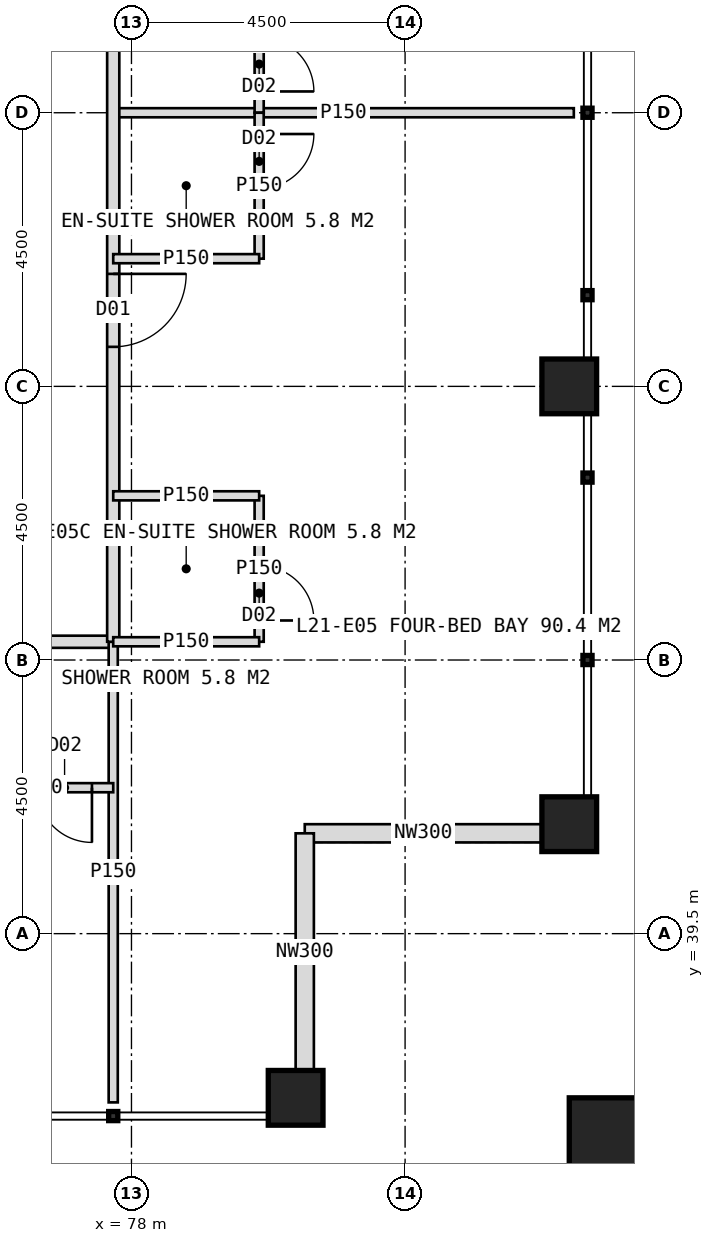
"""IFC4 building model, lengths in metres.
Left out: names, types, materials, properties, quantities, classifications, styles, units other than length and angle.
Written with IfcOpenShell. Run it as: python <this file> out.ifc"""

import sys

from ifc_helpers import new_model, si_unit, direction, frame, frame_2d, origin, origin_2d, place, context, subcontext, project, spatial, rectangle, hollow_rectangle, extrude, element, fill, save


model = new_model("IFC4")
c1 = context("Model", 3, precision=1e-05, world=origin(), true_north=direction((0.0, 1.0)))
c2 = subcontext(c1, "Body", "Model", "MODEL_VIEW")
j1 = project(units=[si_unit("LENGTHUNIT", "METRE"), si_unit("PLANEANGLEUNIT", "RADIAN")], contexts=[c1])
p1 = place(None, origin())
s1 = spatial("IfcSite", under=j1, at=p1, CompositionType="ELEMENT")
p2 = place(p1, origin())
s2 = spatial("IfcBuilding", under=s1, at=p2, CompositionType="ELEMENT")
p3 = place(p2, frame((0.0, 0.0, 91.0)))
s3 = spatial("IfcBuildingStorey", under=s2, at=p3, CompositionType="ELEMENT", Elevation=91.0)
for number, where, z_axis, x_axis in (
    (1, (85.2, 41.3, 0.0), (0.0, 0.0, 1.0), (1.0, 0.0, 0.0)),
    (2, (85.2, 48.5, 0.0), (0.0, 0.0, 1.0), (1.0, 0.0, 0.0)),
    (3, (80.7, 36.8, 0.0), (0.0, 0.0, 1.0), (1.0, 0.0, 0.0)),
):
    element("IfcColumn", number, at=place(p3, frame(where, z_axis=z_axis, x_axis=x_axis)), inside=s3, PredefinedType="COLUMN", context=c2, shape_type="SweptSolid", body=[
        extrude(hollow_rectangle(XDim=0.9, YDim=0.9, WallThickness=0.08, at=origin_2d()), origin(), (0.0, 0.0, 1.0), 4.0),
    ])
p4 = place(p3, frame((86.1, 35.9, 0.0), z_axis=(0.0, 0.0, 1.0), x_axis=(1.0, 0.0, 0.0)))
e4 = element("IfcColumn", 4, at=p4, inside=s3, PredefinedType="COLUMN", context=c2, shape_type="SweptSolid", body=[
    extrude(hollow_rectangle(XDim=1.8, YDim=1.8, WallThickness=0.1, at=origin_2d()), origin(), (0.0, 0.0, 1.0), 2.0),
])
for number, where, z_axis, x_axis in (
    (5, (84.75, 41.15, 0.0), (0.0, 0.0, 1.0), (-1.0, 0.0, 0.0)),
    (6, (80.85, 41.15, 0.0), (0.0, 0.0, 1.0), (0.0, -1.0, 0.0)),
):
    element("IfcWall", number, at=place(p3, frame(where, z_axis=z_axis, x_axis=x_axis)), inside=s3, PredefinedType="ELEMENTEDWALL", context=c2, shape_type="SweptSolid", body=[
        extrude(rectangle(XDim=3.9, YDim=0.3, at=frame_2d((1.95, 0.0))), origin(), (0.0, 0.0, 1.0), 2.95),
    ])
p5 = place(p3, frame((77.7, 44.3, 0.0), z_axis=(0.0, 0.0, 1.0), x_axis=(-1.0, 0.0, 0.0)))
e7 = element("IfcWall", 7, at=p5, inside=s3, PredefinedType="PARTITIONING", context=c2, shape_type="SweptSolid", body=[
    extrude(rectangle(XDim=35.4, YDim=0.2, at=frame_2d((17.7, 0.0))), origin(), (0.0, 0.0, 1.0), 3.75),
])
p6 = place(p5, frame((2.65, 0.0, 0.0)))
e8 = element("IfcOpeningElement", 8, at=p6, cuts=e7, PredefinedType="OPENING", context=c2, shape_type="SweptSolid", body=[
    extrude(rectangle(XDim=1.2, YDim=2.2, at=frame_2d((0.6, 1.1))), frame((0.0, 0.11, 0.0), z_axis=(0.0, -1.0, 0.0), x_axis=(1.0, 0.0, 0.0)), (0.0, 0.0, 1.0), 0.22),
])
p7 = place(p5, frame((11.35, 0.0, 0.0)))
e9 = element("IfcOpeningElement", 9, at=p7, cuts=e7, PredefinedType="OPENING", context=c2, shape_type="SweptSolid", body=[
    extrude(rectangle(XDim=1.2, YDim=2.2, at=frame_2d((0.6, 1.1))), frame((0.0, 0.11, 0.0), z_axis=(0.0, -1.0, 0.0), x_axis=(1.0, 0.0, 0.0)), (0.0, 0.0, 1.0), 0.22),
])
p8 = place(p5, frame((20.35, 0.0, 0.0)))
e10 = element("IfcOpeningElement", 10, at=p8, cuts=e7, PredefinedType="OPENING", context=c2, shape_type="SweptSolid", body=[
    extrude(rectangle(XDim=1.2, YDim=2.2, at=frame_2d((0.6, 1.1))), frame((0.0, 0.11, 0.0), z_axis=(0.0, -1.0, 0.0), x_axis=(1.0, 0.0, 0.0)), (0.0, 0.0, 1.0), 0.22),
])
p9 = place(p5, frame((29.35, 0.0, 0.0)))
e11 = element("IfcOpeningElement", 11, at=p9, cuts=e7, PredefinedType="OPENING", context=c2, shape_type="SweptSolid", body=[
    extrude(rectangle(XDim=1.2, YDim=2.2, at=frame_2d((0.6, 1.1))), frame((0.0, 0.11, 0.0), z_axis=(0.0, -1.0, 0.0), x_axis=(1.0, 0.0, 0.0)), (0.0, 0.0, 1.0), 0.22),
])
p10 = place(p3, frame((77.7, 44.3, 0.0), z_axis=(0.0, 0.0, 1.0), x_axis=(0.0, -1.0, 0.0)))
e12 = element("IfcWall", 12, at=p10, inside=s3, PredefinedType="PARTITIONING", context=c2, shape_type="SweptSolid", body=[
    extrude(rectangle(XDim=7.575, YDim=0.15, at=frame_2d((3.788, 0.0))), origin(), (0.0, 0.0, 1.0), 3.75),
])
p11 = place(p3, frame((77.7, 41.9, 0.0), z_axis=(0.0, 0.0, 1.0), x_axis=(-1.0, 0.0, 0.0)))
e13 = element("IfcWall", 13, at=p11, inside=s3, PredefinedType="PARTITIONING", context=c2, shape_type="SweptSolid", body=[
    extrude(rectangle(XDim=2.4, YDim=0.15, at=frame_2d((1.2, 0.0))), origin(), (0.0, 0.0, 1.0), 3.75),
])
p12 = place(p11, frame((0.35, 0.0, 0.0)))
e14 = element("IfcOpeningElement", 14, at=p12, cuts=e13, PredefinedType="OPENING", context=c2, shape_type="SweptSolid", body=[
    extrude(rectangle(XDim=0.9, YDim=2.1, at=frame_2d((0.45, 1.05))), frame((0.0, 0.085, 0.0), z_axis=(0.0, -1.0, 0.0), x_axis=(1.0, 0.0, 0.0)), (0.0, 0.0, 1.0), 0.17),
])
p13 = place(p3, frame((77.7, 53.0, 0.0), z_axis=(0.0, 0.0, 1.0), x_axis=(1.0, 0.0, 0.0)))
e15 = element("IfcWall", 15, at=p13, inside=s3, PredefinedType="PARTITIONING", context=c2, shape_type="SweptSolid", body=[
    extrude(rectangle(XDim=7.575, YDim=0.15, at=frame_2d((3.788, 0.0))), origin(), (0.0, 0.0, 1.0), 3.75),
])
p14 = place(p3, frame((77.7, 79.7, 0.0), z_axis=(0.0, 0.0, 1.0), x_axis=(0.0, -1.0, 0.0)))
e16 = element("IfcWall", 16, at=p14, inside=s3, PredefinedType="PARTITIONING", context=c2, shape_type="SweptSolid", body=[
    extrude(rectangle(XDim=35.4, YDim=0.2, at=frame_2d((17.7, 0.0))), origin(), (0.0, 0.0, 1.0), 3.75),
])
p15 = place(p14, frame((2.65, 0.0, 0.0)))
e17 = element("IfcOpeningElement", 17, at=p15, cuts=e16, PredefinedType="OPENING", context=c2, shape_type="SweptSolid", body=[
    extrude(rectangle(XDim=1.2, YDim=2.2, at=frame_2d((0.6, 1.1))), frame((0.0, 0.11, 0.0), z_axis=(0.0, -1.0, 0.0), x_axis=(1.0, 0.0, 0.0)), (0.0, 0.0, 1.0), 0.22),
])
p16 = place(p14, frame((8.35, 0.0, 0.0)))
e18 = element("IfcOpeningElement", 18, at=p16, cuts=e16, PredefinedType="OPENING", context=c2, shape_type="SweptSolid", body=[
    extrude(rectangle(XDim=1.2, YDim=2.2, at=frame_2d((0.6, 1.1))), frame((0.0, 0.11, 0.0), z_axis=(0.0, -1.0, 0.0), x_axis=(1.0, 0.0, 0.0)), (0.0, 0.0, 1.0), 0.22),
])
p17 = place(p14, frame((14.35, 0.0, 0.0)))
e19 = element("IfcOpeningElement", 19, at=p17, cuts=e16, PredefinedType="OPENING", context=c2, shape_type="SweptSolid", body=[
    extrude(rectangle(XDim=1.2, YDim=2.2, at=frame_2d((0.6, 1.1))), frame((0.0, 0.11, 0.0), z_axis=(0.0, -1.0, 0.0), x_axis=(1.0, 0.0, 0.0)), (0.0, 0.0, 1.0), 0.22),
])
p18 = place(p14, frame((20.35, 0.0, 0.0)))
e20 = element("IfcOpeningElement", 20, at=p18, cuts=e16, PredefinedType="OPENING", context=c2, shape_type="SweptSolid", body=[
    extrude(rectangle(XDim=1.2, YDim=2.2, at=frame_2d((0.6, 1.1))), frame((0.0, 0.11, 0.0), z_axis=(0.0, -1.0, 0.0), x_axis=(1.0, 0.0, 0.0)), (0.0, 0.0, 1.0), 0.22),
])
p19 = place(p14, frame((29.35, 0.0, 0.0)))
e21 = element("IfcOpeningElement", 21, at=p19, cuts=e16, PredefinedType="OPENING", context=c2, shape_type="SweptSolid", body=[
    extrude(rectangle(XDim=1.2, YDim=2.2, at=frame_2d((0.6, 1.1))), frame((0.0, 0.11, 0.0), z_axis=(0.0, -1.0, 0.0), x_axis=(1.0, 0.0, 0.0)), (0.0, 0.0, 1.0), 0.22),
])
p20 = place(p3, frame((80.1, 55.4, 0.0), z_axis=(0.0, 0.0, 1.0), x_axis=(0.0, -1.0, 0.0)))
e22 = element("IfcWall", 22, at=p20, inside=s3, PredefinedType="PARTITIONING", context=c2, shape_type="SweptSolid", body=[
    extrude(rectangle(XDim=2.4, YDim=0.15, at=frame_2d((1.2, 0.0))), origin(), (0.0, 0.0, 1.0), 3.75),
])
p21 = place(p20, frame((1.15, 0.0, 0.0)))
e23 = element("IfcOpeningElement", 23, at=p21, cuts=e22, PredefinedType="OPENING", context=c2, shape_type="SweptSolid", body=[
    extrude(rectangle(XDim=0.9, YDim=2.1, at=frame_2d((0.45, 1.05))), frame((0.0, 0.085, 0.0), z_axis=(0.0, -1.0, 0.0), x_axis=(1.0, 0.0, 0.0)), (0.0, 0.0, 1.0), 0.17),
])
p22 = place(p3, frame((80.1, 53.0, 0.0), z_axis=(0.0, 0.0, 1.0), x_axis=(0.0, -1.0, 0.0)))
e24 = element("IfcWall", 24, at=p22, inside=s3, PredefinedType="PARTITIONING", context=c2, shape_type="SweptSolid", body=[
    extrude(rectangle(XDim=2.4, YDim=0.15, at=frame_2d((1.2, 0.0))), origin(), (0.0, 0.0, 1.0), 3.75),
])
p23 = place(p22, frame((0.35, 0.0, 0.0)))
e25 = element("IfcOpeningElement", 25, at=p23, cuts=e24, PredefinedType="OPENING", context=c2, shape_type="SweptSolid", body=[
    extrude(rectangle(XDim=0.9, YDim=2.1, at=frame_2d((0.45, 1.05))), frame((0.0, 0.085, 0.0), z_axis=(0.0, -1.0, 0.0), x_axis=(1.0, 0.0, 0.0)), (0.0, 0.0, 1.0), 0.17),
])
p24 = place(p3, frame((77.7, 50.6, 0.0), z_axis=(0.0, 0.0, 1.0), x_axis=(1.0, 0.0, 0.0)))
e26 = element("IfcWall", 26, at=p24, inside=s3, PredefinedType="PARTITIONING", context=c2, shape_type="SweptSolid", body=[
    extrude(rectangle(XDim=2.4, YDim=0.15, at=frame_2d((1.2, 0.0))), origin(), (0.0, 0.0, 1.0), 3.75),
])
p25 = place(p3, frame((80.1, 46.7, 0.0), z_axis=(0.0, 0.0, 1.0), x_axis=(0.0, -1.0, 0.0)))
e27 = element("IfcWall", 27, at=p25, inside=s3, PredefinedType="PARTITIONING", context=c2, shape_type="SweptSolid", body=[
    extrude(rectangle(XDim=2.4, YDim=0.15, at=frame_2d((1.2, 0.0))), origin(), (0.0, 0.0, 1.0), 3.75),
])
p26 = place(p25, frame((1.15, 0.0, 0.0)))
e28 = element("IfcOpeningElement", 28, at=p26, cuts=e27, PredefinedType="OPENING", context=c2, shape_type="SweptSolid", body=[
    extrude(rectangle(XDim=0.9, YDim=2.1, at=frame_2d((0.45, 1.05))), frame((0.0, 0.085, 0.0), z_axis=(0.0, -1.0, 0.0), x_axis=(1.0, 0.0, 0.0)), (0.0, 0.0, 1.0), 0.17),
])
for number, where, z_axis, x_axis in (
    (29, (77.7, 46.7, 0.0), (0.0, 0.0, 1.0), (1.0, 0.0, 0.0)),
    (30, (77.7, 44.3, 0.0), (0.0, 0.0, 1.0), (1.0, 0.0, 0.0)),
):
    element("IfcWall", number, at=place(p3, frame(where, z_axis=z_axis, x_axis=x_axis)), inside=s3, PredefinedType="PARTITIONING", context=c2, shape_type="SweptSolid", body=[
        extrude(rectangle(XDim=2.4, YDim=0.15, at=frame_2d((1.2, 0.0))), origin(), (0.0, 0.0, 1.0), 3.75),
    ])
p27 = place(p12, origin())
e31 = element("IfcDoor", 31, at=p27, inside=s3, OperationType="SINGLE_SWING_LEFT", PredefinedType="DOOR", context=c2, shape_type="SweptSolid", body=[
    extrude(rectangle(XDim=0.9, YDim=2.1, at=frame_2d((0.45, 1.05))), frame((0.0, 0.025, 0.0), z_axis=(0.0, -1.0, 0.0), x_axis=(1.0, 0.0, 0.0)), (0.0, 0.0, 1.0), 0.05),
])
fill(e14, e31)
p28 = place(p21, origin())
e32 = element("IfcDoor", 32, at=p28, inside=s3, OperationType="SINGLE_SWING_RIGHT", PredefinedType="DOOR", context=c2, shape_type="SweptSolid", body=[
    extrude(rectangle(XDim=0.9, YDim=2.1, at=frame_2d((0.45, 1.05))), frame((0.0, 0.025, 0.0), z_axis=(0.0, -1.0, 0.0), x_axis=(1.0, 0.0, 0.0)), (0.0, 0.0, 1.0), 0.05),
])
fill(e23, e32)
p29 = place(p19, origin())
e33 = element("IfcDoor", 33, at=p29, inside=s3, OperationType="SINGLE_SWING_LEFT", PredefinedType="DOOR", context=c2, shape_type="SweptSolid", body=[
    extrude(rectangle(XDim=1.2, YDim=2.2, at=frame_2d((0.6, 1.1))), frame((0.0, 0.025, 0.0), z_axis=(0.0, -1.0, 0.0), x_axis=(1.0, 0.0, 0.0)), (0.0, 0.0, 1.0), 0.05),
])
fill(e21, e33)
p30 = place(p23, origin())
e34 = element("IfcDoor", 34, at=p30, inside=s3, OperationType="SINGLE_SWING_LEFT", PredefinedType="DOOR", context=c2, shape_type="SweptSolid", body=[
    extrude(rectangle(XDim=0.9, YDim=2.1, at=frame_2d((0.45, 1.05))), frame((0.0, 0.025, 0.0), z_axis=(0.0, -1.0, 0.0), x_axis=(1.0, 0.0, 0.0)), (0.0, 0.0, 1.0), 0.05),
])
fill(e25, e34)
p31 = place(p26, origin())
e35 = element("IfcDoor", 35, at=p31, inside=s3, OperationType="SINGLE_SWING_RIGHT", PredefinedType="DOOR", context=c2, shape_type="SweptSolid", body=[
    extrude(rectangle(XDim=0.9, YDim=2.1, at=frame_2d((0.45, 1.05))), frame((0.0, 0.025, 0.0), z_axis=(0.0, -1.0, 0.0), x_axis=(1.0, 0.0, 0.0)), (0.0, 0.0, 1.0), 0.05),
])
fill(e28, e35)
save(model, sys.argv[1])
